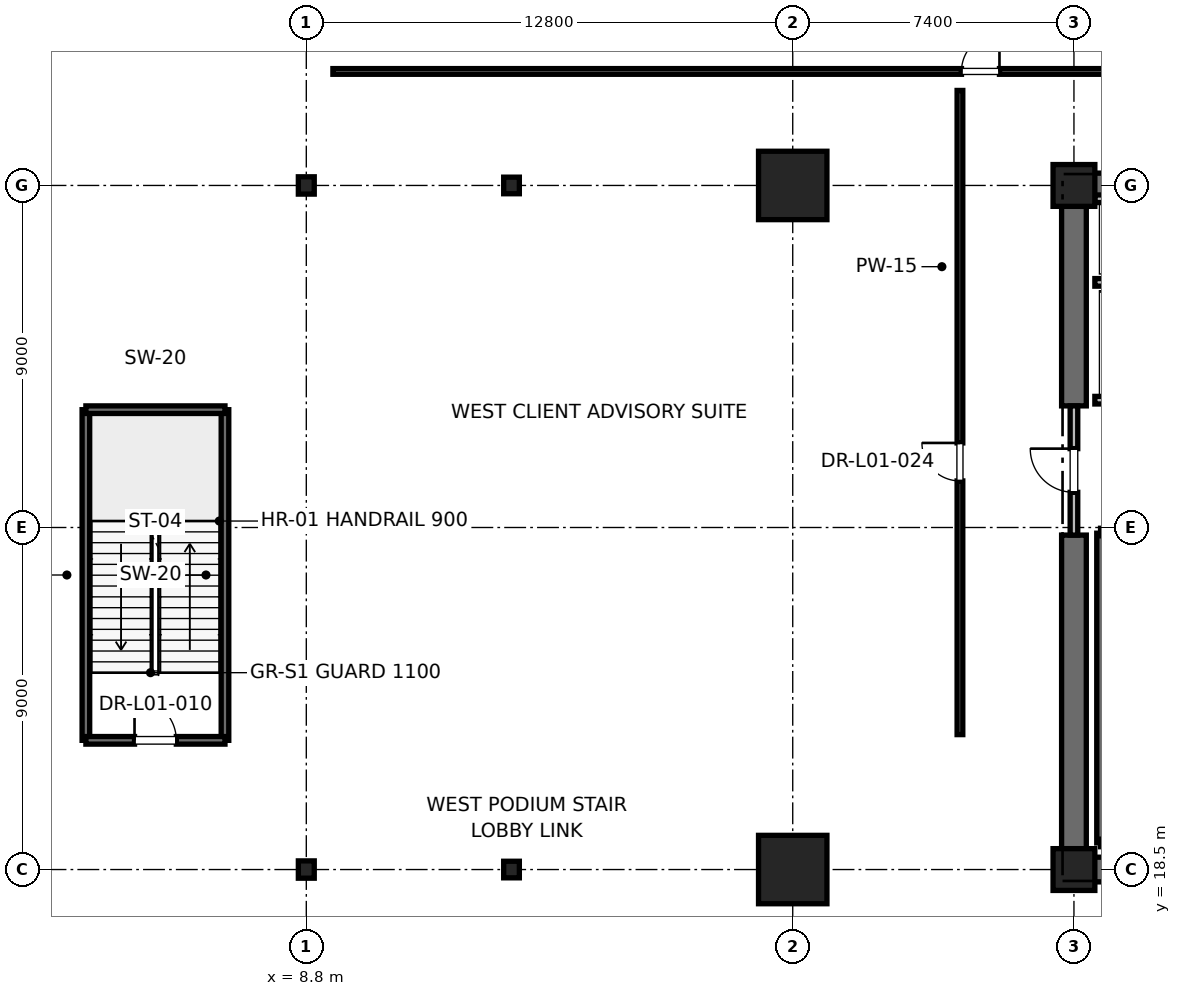
"""IFC4 building model, lengths in metres.
Left out: names, types, materials, properties, quantities, classifications, styles, units other than length and angle.
Written with IfcOpenShell. Run it as: python <this file> out.ifc"""

import sys

from ifc_helpers import new_model, si_unit, direction, frame, frame_2d, origin, origin_2d, place, context, subcontext, project, spatial, rectangle, i_section, extrude, element, fill, save


model = new_model("IFC4")
c1 = context("Model", 3, precision=1e-05, world=origin(), true_north=direction((0.0, 1.0)))
c2 = subcontext(c1, "Body", "Model", "MODEL_VIEW")
j1 = project(units=[si_unit("LENGTHUNIT", "METRE"), si_unit("PLANEANGLEUNIT", "RADIAN")], contexts=[c1])
p1 = place(None, origin())
s1 = spatial("IfcSite", under=j1, at=p1, CompositionType="ELEMENT")
p2 = place(p1, origin())
s2 = spatial("IfcBuilding", under=s1, at=p2, CompositionType="ELEMENT")
p3 = place(p2, frame((0.0, 0.0, 6.0)))
s3 = spatial("IfcBuildingStorey", under=s2, at=p3, CompositionType="ELEMENT", Elevation=6.0)
for number, where, z_axis, x_axis in (
    (1, (21.6, 18.5, 0.0), (0.0, 0.0, 1.0), (1.0, 0.0, 0.0)),
    (2, (21.6, 36.5, 0.0), (0.0, 0.0, 1.0), (1.0, 0.0, 0.0)),
):
    element("IfcColumn", number, at=place(p3, frame(where, z_axis=z_axis, x_axis=x_axis)), inside=s3, PredefinedType="COLUMN", context=c2, shape_type="SweptSolid", body=[
        extrude(rectangle(XDim=1.8, YDim=1.8, at=origin_2d()), origin(), (0.0, 0.0, 1.0), 5.2),
    ])
for number, where, z_axis, x_axis in (
    (3, (14.2, 18.5, 0.0), (0.0, 0.0, 1.0), (1.0, 0.0, 0.0)),
    (4, (14.2, 36.5, 0.0), (0.0, 0.0, 1.0), (1.0, 0.0, 0.0)),
):
    element("IfcColumn", number, at=place(p3, frame(where, z_axis=z_axis, x_axis=x_axis)), inside=s3, PredefinedType="COLUMN", context=c2, shape_type="SweptSolid", body=[
        extrude(i_section(OverallWidth=0.412, OverallDepth=0.437, WebThickness=0.036, FlangeThickness=0.058, FilletRadius=0.015, at=origin_2d()), origin(), (0.0, 0.0, 1.0), 5.2),
    ])
for number, where, z_axis, x_axis in (
    (5, (29.0, 18.5, 0.0), (0.0, 0.0, 1.0), (1.0, 0.0, 0.0)),
    (6, (29.0, 36.5, 0.0), (0.0, 0.0, 1.0), (1.0, 0.0, 0.0)),
):
    element("IfcColumn", number, at=place(p3, frame(where, z_axis=z_axis, x_axis=x_axis)), inside=s3, PredefinedType="PILASTER", context=c2, shape_type="SweptSolid", body=[
        extrude(rectangle(XDim=1.1, YDim=1.1, at=origin_2d()), origin(), (0.0, 0.0, 1.0), 5.2),
    ])
for number, where, z_axis, x_axis in (
    (7, (8.8, 18.5, 0.0), (0.0, 0.0, 1.0), (1.0, 0.0, 0.0)),
    (8, (8.8, 36.5, 0.0), (0.0, 0.0, 1.0), (1.0, 0.0, 0.0)),
):
    element("IfcColumn", number, at=place(p3, frame(where, z_axis=z_axis, x_axis=x_axis)), inside=s3, PredefinedType="COLUMN", context=c2, shape_type="SweptSolid", body=[
        extrude(i_section(OverallWidth=0.418, OverallDepth=0.456, WebThickness=0.042, FlangeThickness=0.067, FilletRadius=0.015, at=origin_2d()), origin(), (0.0, 0.0, 1.0), 5.2),
    ])
p4 = place(p3, frame((29.0, 18.5, 0.0), z_axis=(0.0, 0.0, 1.0), x_axis=(1.0, 0.0, 0.0)))
e9 = element("IfcWall", 9, at=p4, inside=s3, PredefinedType="SHEAR", context=c2, shape_type="SweptSolid", body=[
    extrude(rectangle(XDim=9.2, YDim=0.65, at=frame_2d((4.6, 0.0))), origin(), (0.0, 0.0, 1.0), 4.92),
])
p5 = place(p3, frame((29.0, 36.5, 0.0), z_axis=(0.0, 0.0, 1.0), x_axis=(1.0, 0.0, 0.0)))
e10 = element("IfcWall", 10, at=p5, inside=s3, PredefinedType="SHEAR", context=c2, shape_type="SweptSolid", body=[
    extrude(rectangle(XDim=5.8, YDim=0.65, at=frame_2d((2.9, 0.0))), origin(), (0.0, 0.0, 1.0), 4.92),
])
p6 = place(p3, frame((29.0, 18.5, 0.0), z_axis=(0.0, 0.0, 1.0), x_axis=(0.0, 1.0, 0.0)))
e11 = element("IfcWall", 11, at=p6, inside=s3, PredefinedType="SHEAR", context=c2, shape_type="SweptSolid", body=[
    extrude(rectangle(XDim=8.8, YDim=0.65, at=frame_2d((4.4, 0.0))), origin(), (0.0, 0.0, 1.0), 4.92),
])
p7 = place(p3, frame((29.0, 30.7, 0.0), z_axis=(0.0, 0.0, 1.0), x_axis=(0.0, 1.0, 0.0)))
e12 = element("IfcWall", 12, at=p7, inside=s3, PredefinedType="SHEAR", context=c2, shape_type="SweptSolid", body=[
    extrude(rectangle(XDim=5.8, YDim=0.65, at=frame_2d((2.9, 0.0))), origin(), (0.0, 0.0, 1.0), 4.92),
])
p8 = place(p3, frame((29.7, 19.2, 0.0), z_axis=(0.0, 0.0, 1.0), x_axis=(0.0, 1.0, 0.0)))
e13 = element("IfcWall", 13, at=p8, inside=s3, PredefinedType="SOLIDWALL", context=c2, shape_type="SweptSolid", body=[
    extrude(rectangle(XDim=8.15, YDim=0.2, at=frame_2d((4.075, 0.0))), origin(), (0.0, 0.0, 1.0), 4.92),
])
for number, where, z_axis, x_axis in (
    (14, (3.0, 21.9, 0.0), (0.0, 0.0, 1.0), (0.0, 1.0, 0.0)),
    (15, (6.66, 21.9, 0.0), (0.0, 0.0, 1.0), (0.0, 1.0, 0.0)),
):
    element("IfcWall", number, at=place(p3, frame(where, z_axis=z_axis, x_axis=x_axis)), inside=s3, PredefinedType="SOLIDWALL", context=c2, shape_type="SweptSolid", body=[
        extrude(rectangle(XDim=8.7, YDim=0.2, at=frame_2d((4.35, 0.0))), origin(), (0.0, 0.0, 1.0), 4.92),
    ])
p9 = place(p3, frame((3.0, 30.6, 0.0), z_axis=(0.0, 0.0, 1.0), x_axis=(1.0, 0.0, 0.0)))
e16 = element("IfcWall", 16, at=p9, inside=s3, PredefinedType="SOLIDWALL", context=c2, shape_type="SweptSolid", body=[
    extrude(rectangle(XDim=3.66, YDim=0.2, at=frame_2d((1.83, 0.0))), origin(), (0.0, 0.0, 1.0), 4.92),
])
p10 = place(p3, frame((3.0, 21.9, 0.0), z_axis=(0.0, 0.0, 1.0), x_axis=(1.0, 0.0, 0.0)))
e17 = element("IfcWall", 17, at=p10, inside=s3, PredefinedType="SOLIDWALL", context=c2, shape_type="SweptSolid", body=[
    extrude(rectangle(XDim=3.66, YDim=0.2, at=frame_2d((1.83, 0.0))), origin(), (0.0, 0.0, 1.0), 4.92),
])
p11 = place(p10, frame((1.28, 0.0, 0.0)))
e18 = element("IfcOpeningElement", 18, at=p11, cuts=e17, PredefinedType="OPENING", context=c2, shape_type="SweptSolid", body=[
    extrude(rectangle(XDim=1.1, YDim=2.15, at=frame_2d((0.55, 1.075))), frame((0.0, 0.1, 0.0), z_axis=(0.0, -1.0, 0.0), x_axis=(1.0, 0.0, 0.0)), (0.0, 0.0, 1.0), 0.2),
])
p12 = place(p3, frame((29.0, 27.3, 0.0), z_axis=(0.0, 0.0, 1.0), x_axis=(0.0, 1.0, 0.0)))
e19 = element("IfcWall", 19, at=p12, inside=s3, PredefinedType="PARTITIONING", context=c2, shape_type="SweptSolid", body=[
    extrude(rectangle(XDim=3.4, YDim=0.2, at=frame_2d((1.7, 0.0))), origin(), (0.0, 0.0, 1.0), 3.7),
])
p13 = place(p12, frame((1.125, 0.0, 0.0)))
e20 = element("IfcOpeningElement", 20, at=p13, cuts=e19, PredefinedType="OPENING", context=c2, shape_type="SweptSolid", body=[
    extrude(rectangle(XDim=1.15, YDim=2.2, at=frame_2d((0.575, 1.1))), frame((0.0, 0.1, 0.0), z_axis=(0.0, -1.0, 0.0), x_axis=(1.0, 0.0, 0.0)), (0.0, 0.0, 1.0), 0.2),
])
p14 = place(p3, frame((29.55, 30.85, 0.0), z_axis=(0.0, 0.0, 1.0), x_axis=(1.0, 0.0, 0.0)))
e21 = element("IfcWall", 21, at=p14, inside=s3, PredefinedType="SOLIDWALL", context=c2, shape_type="SweptSolid", body=[
    extrude(rectangle(XDim=2.6, YDim=0.2, at=frame_2d((1.3, 0.0))), origin(), (0.0, 0.0, 1.0), 3.7),
])
p15 = place(p14, frame((0.75, 0.0, 0.0)))
e22 = element("IfcOpeningElement", 22, at=p15, cuts=e21, PredefinedType="OPENING", context=c2, shape_type="SweptSolid", body=[
    extrude(rectangle(XDim=1.1, YDim=2.2, at=frame_2d((0.55, 1.1))), frame((0.0, 0.1, 0.0), z_axis=(0.0, -1.0, 0.0), x_axis=(1.0, 0.0, 0.0)), (0.0, 0.0, 1.0), 0.2),
])
p16 = place(p3, frame((29.55, 33.95, 0.0), z_axis=(0.0, 0.0, 1.0), x_axis=(1.0, 0.0, 0.0)))
e23 = element("IfcWall", 23, at=p16, inside=s3, PredefinedType="SOLIDWALL", context=c2, shape_type="SweptSolid", body=[
    extrude(rectangle(XDim=2.8, YDim=0.2, at=frame_2d((1.4, 0.0))), origin(), (0.0, 0.0, 1.0), 4.92),
])
p17 = place(p3, frame((32.35, 36.15, 0.0), z_axis=(0.0, 0.0, 1.0), x_axis=(-1.0, 0.0, 0.0)))
e24 = element("IfcWall", 24, at=p17, inside=s3, PredefinedType="SOLIDWALL", context=c2, shape_type="SweptSolid", body=[
    extrude(rectangle(XDim=2.8, YDim=0.2, at=frame_2d((1.4, 0.0))), origin(), (0.0, 0.0, 1.0), 3.979),
])
p18 = place(p3, frame((9.5, 39.5, 0.0), z_axis=(0.0, 0.0, 1.0), x_axis=(1.0, 0.0, 0.0)))
e25 = element("IfcWall", 25, at=p18, inside=s3, PredefinedType="PARTITIONING", context=c2, shape_type="SweptSolid", body=[
    extrude(rectangle(XDim=34.15, YDim=0.15, at=frame_2d((17.075, 0.0))), origin(), (0.0, 0.0, 1.0), 2.85),
])
p19 = place(p18, frame((16.54, 0.0, 0.0)))
e26 = element("IfcOpeningElement", 26, at=p19, cuts=e25, PredefinedType="OPENING", context=c2, shape_type="SweptSolid", body=[
    extrude(rectangle(XDim=1.0, YDim=2.15, at=frame_2d((0.5, 1.075))), frame((0.0, 0.075, 0.0), z_axis=(0.0, -1.0, 0.0), x_axis=(1.0, 0.0, 0.0)), (0.0, 0.0, 1.0), 0.15),
])
p20 = place(p3, frame((26.0, 22.05, 0.0), z_axis=(0.0, 0.0, 1.0), x_axis=(0.0, 1.0, 0.0)))
e27 = element("IfcWall", 27, at=p20, inside=s3, PredefinedType="PARTITIONING", context=c2, shape_type="SweptSolid", body=[
    extrude(rectangle(XDim=16.95, YDim=0.15, at=frame_2d((8.475, 0.0))), origin(), (0.0, 0.0, 1.0), 2.85),
])
p21 = place(p20, frame((6.675, 0.0, 0.0)))
e28 = element("IfcOpeningElement", 28, at=p21, cuts=e27, PredefinedType="OPENING", context=c2, shape_type="SweptSolid", body=[
    extrude(rectangle(XDim=1.0, YDim=2.15, at=frame_2d((0.5, 1.075))), frame((0.0, 0.075, 0.0), z_axis=(0.0, -1.0, 0.0), x_axis=(1.0, 0.0, 0.0)), (0.0, 0.0, 1.0), 0.15),
])
p22 = place(p11, origin())
e29 = element("IfcDoor", 29, at=p22, inside=s3, OperationType="SINGLE_SWING_LEFT", PredefinedType="DOOR", context=c2, shape_type="SweptSolid", body=[
    extrude(rectangle(XDim=1.1, YDim=2.15, at=frame_2d((0.55, 1.075))), frame((0.0, 0.025, 0.0), z_axis=(0.0, -1.0, 0.0), x_axis=(1.0, 0.0, 0.0)), (0.0, 0.0, 1.0), 0.05),
])
fill(e18, e29)
p23 = place(p13, origin())
e30 = element("IfcDoor", 30, at=p23, inside=s3, OperationType="SINGLE_SWING_RIGHT", PredefinedType="DOOR", context=c2, shape_type="SweptSolid", body=[
    extrude(rectangle(XDim=1.15, YDim=2.2, at=frame_2d((0.575, 1.1))), frame((0.0, 0.025, 0.0), z_axis=(0.0, -1.0, 0.0), x_axis=(1.0, 0.0, 0.0)), (0.0, 0.0, 1.0), 0.05),
])
fill(e20, e30)
p24 = place(p19, origin())
e31 = element("IfcDoor", 31, at=p24, inside=s3, OperationType="SINGLE_SWING_RIGHT", PredefinedType="DOOR", context=c2, shape_type="SweptSolid", body=[
    extrude(rectangle(XDim=1.0, YDim=2.15, at=frame_2d((0.5, 1.075))), frame((0.0, 0.025, 0.0), z_axis=(0.0, -1.0, 0.0), x_axis=(1.0, 0.0, 0.0)), (0.0, 0.0, 1.0), 0.05),
])
fill(e26, e31)
p25 = place(p21, origin())
e32 = element("IfcDoor", 32, at=p25, inside=s3, OperationType="SINGLE_SWING_RIGHT", PredefinedType="DOOR", context=c2, shape_type="SweptSolid", body=[
    extrude(rectangle(XDim=1.0, YDim=2.15, at=frame_2d((0.5, 1.075))), frame((0.0, 0.025, 0.0), z_axis=(0.0, -1.0, 0.0), x_axis=(1.0, 0.0, 0.0)), (0.0, 0.0, 1.0), 0.05),
])
fill(e28, e32)
save(model, sys.argv[1])
